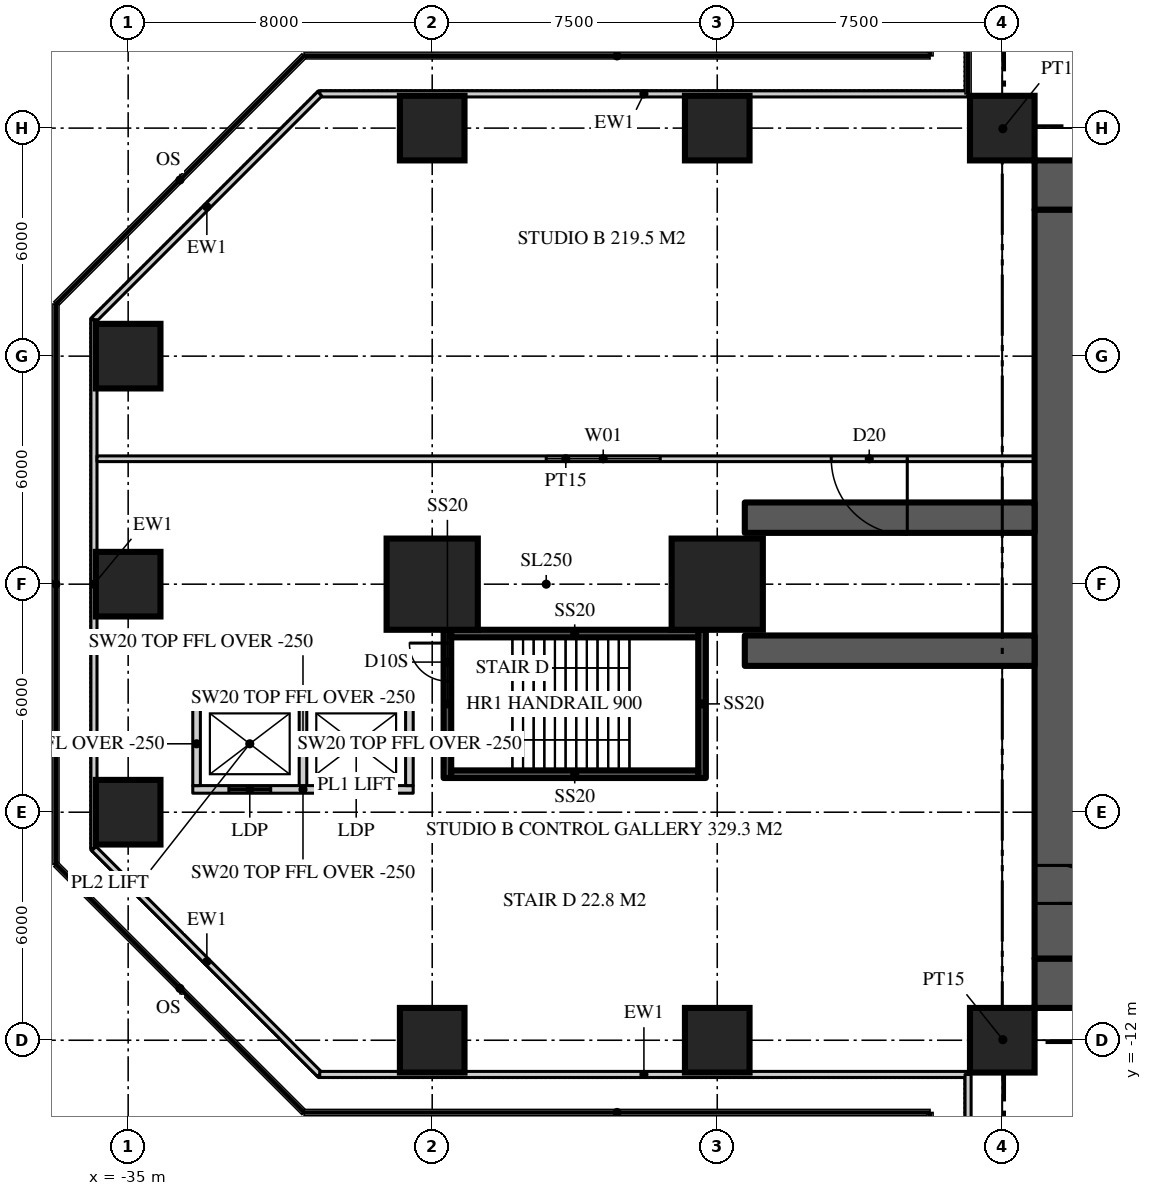
"""IFC4 building model, lengths in metres.
Left out: names, types, materials, properties, quantities, classifications, styles, units other than length and angle.
Written with IfcOpenShell. Run it as: python <this file> out.ifc"""

import sys

from ifc_helpers import new_model, si_unit, direction, frame, frame_2d, origin, origin_2d, place, context, subcontext, project, spatial, rectangle, extrude, element, fill, save


model = new_model("IFC4")
c1 = context("Model", 3, precision=1e-05, world=origin(), true_north=direction((0.0, 1.0)))
c2 = subcontext(c1, "Body", "Model", "MODEL_VIEW")
j1 = project(units=[si_unit("LENGTHUNIT", "METRE"), si_unit("PLANEANGLEUNIT", "RADIAN")], contexts=[c1])
p1 = place(None, origin())
s1 = spatial("IfcSite", under=j1, at=p1, CompositionType="ELEMENT")
p2 = place(p1, origin())
s2 = spatial("IfcBuilding", under=s1, at=p2, CompositionType="ELEMENT")
p3 = place(p2, frame((0.0, 0.0, 7.0)))
s3 = spatial("IfcBuildingStorey", under=s2, at=p3, CompositionType="ELEMENT", Elevation=7.0)
p4 = place(p3, frame((-11.15, 10.5, 0.0), z_axis=(0.0, 0.0, 1.0), x_axis=(1.0, 0.0, 0.0)))
e1 = element("IfcWall", 1, at=p4, inside=s3, PredefinedType="SHEAR", context=c2, shape_type="SweptSolid", body=[
    extrude(rectangle(XDim=22.3, YDim=1.3, at=frame_2d((11.15, 0.0))), origin(), (0.0, 0.0, 1.0), 8.0),
])
p5 = place(p4, frame((4.25, 0.0, 0.0)))
e2 = element("IfcOpeningElement", 2, at=p5, cuts=e1, PredefinedType="OPENING", context=c2, shape_type="SweptSolid", body=[
    extrude(rectangle(XDim=1.8, YDim=2.2, at=frame_2d((0.9, 1.1))), frame((0.0, 0.66, 0.0), z_axis=(0.0, -1.0, 0.0), x_axis=(1.0, 0.0, 0.0)), (0.0, 0.0, 1.0), 1.32),
])
p6 = place(p4, frame((16.25, 0.0, 0.0)))
e3 = element("IfcOpeningElement", 3, at=p6, cuts=e1, PredefinedType="OPENING", context=c2, shape_type="SweptSolid", body=[
    extrude(rectangle(XDim=1.8, YDim=2.2, at=frame_2d((0.9, 1.1))), frame((0.0, 0.66, 0.0), z_axis=(0.0, -1.0, 0.0), x_axis=(1.0, 0.0, 0.0)), (0.0, 0.0, 1.0), 1.32),
])
p7 = place(p3, frame((11.15, -10.5, 0.0), z_axis=(0.0, 0.0, 1.0), x_axis=(-1.0, 0.0, 0.0)))
e4 = element("IfcWall", 4, at=p7, inside=s3, PredefinedType="SHEAR", context=c2, shape_type="SweptSolid", body=[
    extrude(rectangle(XDim=22.3, YDim=1.3, at=frame_2d((11.15, 0.0))), origin(), (0.0, 0.0, 1.0), 8.0),
])
p8 = place(p7, frame((16.25, 0.0, 0.0)))
e5 = element("IfcOpeningElement", 5, at=p8, cuts=e4, PredefinedType="OPENING", context=c2, shape_type="SweptSolid", body=[
    extrude(rectangle(XDim=1.8, YDim=2.2, at=frame_2d((0.9, 1.1))), frame((0.0, 0.66, 0.0), z_axis=(0.0, -1.0, 0.0), x_axis=(1.0, 0.0, 0.0)), (0.0, 0.0, 1.0), 1.32),
])
p9 = place(p7, frame((4.25, 0.0, 0.0)))
e6 = element("IfcOpeningElement", 6, at=p9, cuts=e4, PredefinedType="OPENING", context=c2, shape_type="SweptSolid", body=[
    extrude(rectangle(XDim=1.8, YDim=2.2, at=frame_2d((0.9, 1.1))), frame((0.0, 0.66, 0.0), z_axis=(0.0, -1.0, 0.0), x_axis=(1.0, 0.0, 0.0)), (0.0, 0.0, 1.0), 1.32),
])
p10 = place(p3, frame((-10.5, 9.85, 0.0), z_axis=(0.0, 0.0, 1.0), x_axis=(0.0, -1.0, 0.0)))
e7 = element("IfcWall", 7, at=p10, inside=s3, PredefinedType="SHEAR", context=c2, shape_type="SweptSolid", body=[
    extrude(rectangle(XDim=19.7, YDim=1.3, at=frame_2d((9.85, 0.0))), origin(), (0.0, 0.0, 1.0), 8.0),
])
p11 = place(p10, frame((17.25, 0.0, 0.0)))
e8 = element("IfcOpeningElement", 8, at=p11, cuts=e7, PredefinedType="OPENING", context=c2, shape_type="SweptSolid", body=[
    extrude(rectangle(XDim=1.0, YDim=2.2, at=frame_2d((0.5, 1.1))), frame((0.0, 0.66, 0.0), z_axis=(0.0, -1.0, 0.0), x_axis=(1.0, 0.0, 0.0)), (0.0, 0.0, 1.0), 1.32),
])
for number, where, z_axis, x_axis in (
    (9, (-11.15, 1.75, 0.0), (0.0, 0.0, 1.0), (-1.0, 0.0, 0.0)),
    (10, (-11.15, -1.75, 0.0), (0.0, 0.0, 1.0), (-1.0, 0.0, 0.0)),
):
    element("IfcWall", number, at=place(p3, frame(where, z_axis=z_axis, x_axis=x_axis)), inside=s3, PredefinedType="SHEAR", context=c2, shape_type="SweptSolid", body=[
        extrude(rectangle(XDim=7.625, YDim=0.8, at=frame_2d((3.812, 0.0))), origin(), (0.0, 0.0, 1.0), 8.0),
    ])
for number, where, z_axis, x_axis in (
    (11, (-27.0, -12.0, 0.0), (0.0, 0.0, 1.0), (1.0, 0.0, 0.0)),
    (12, (-19.5, -12.0, 0.0), (0.0, 0.0, 1.0), (1.0, 0.0, 0.0)),
    (13, (-12.0, -12.0, 0.0), (0.0, 0.0, 1.0), (1.0, 0.0, 0.0)),
    (14, (-35.0, -6.0, 0.0), (0.0, 0.0, 1.0), (1.0, 0.0, 0.0)),
    (15, (-35.0, 0.0, 0.0), (0.0, 0.0, 1.0), (1.0, 0.0, 0.0)),
):
    element("IfcColumn", number, at=place(p3, frame(where, z_axis=z_axis, x_axis=x_axis)), inside=s3, PredefinedType="COLUMN", context=c2, shape_type="SweptSolid", body=[
        extrude(rectangle(XDim=1.7, YDim=1.7, at=origin_2d()), origin(), (0.0, 0.0, 1.0), 8.0),
    ])
for number, where, z_axis, x_axis in (
    (16, (-27.0, 0.0, 0.0), (0.0, 0.0, 1.0), (1.0, 0.0, 0.0)),
    (17, (-19.5, 0.0, 0.0), (0.0, 0.0, 1.0), (1.0, 0.0, 0.0)),
):
    element("IfcColumn", number, at=place(p3, frame(where, z_axis=z_axis, x_axis=x_axis)), inside=s3, PredefinedType="COLUMN", context=c2, shape_type="SweptSolid", body=[
        extrude(rectangle(XDim=2.4, YDim=2.4, at=origin_2d()), origin(), (0.0, 0.0, 1.0), 8.0),
    ])
for number, where, z_axis, x_axis in (
    (18, (-35.0, 6.0, 0.0), (0.0, 0.0, 1.0), (1.0, 0.0, 0.0)),
    (19, (-27.0, 12.0, 0.0), (0.0, 0.0, 1.0), (1.0, 0.0, 0.0)),
    (20, (-19.5, 12.0, 0.0), (0.0, 0.0, 1.0), (1.0, 0.0, 0.0)),
    (21, (-12.0, 12.0, 0.0), (0.0, 0.0, 1.0), (1.0, 0.0, 0.0)),
):
    element("IfcColumn", number, at=place(p3, frame(where, z_axis=z_axis, x_axis=x_axis)), inside=s3, PredefinedType="COLUMN", context=c2, shape_type="SweptSolid", body=[
        extrude(rectangle(XDim=1.7, YDim=1.7, at=origin_2d()), origin(), (0.0, 0.0, 1.0), 8.0),
    ])
p12 = place(p3, frame((-12.9, 12.9, 0.0), z_axis=(0.0, 0.0, 1.0), x_axis=(-1.0, 0.0, 0.0)))
e22 = element("IfcWall", 22, at=p12, inside=s3, PredefinedType="SOLIDWALL", context=c2, shape_type="SweptSolid", body=[
    extrude(rectangle(XDim=17.059, YDim=0.16, at=frame_2d((8.529, 0.0))), origin(), (0.0, 0.0, 1.0), 7.75),
])
p13 = place(p3, frame((-29.958, 12.9, 0.0), z_axis=(0.0, 0.0, 1.0), x_axis=(-0.707106781187, -0.707106781187, 0.0)))
e23 = element("IfcWall", 23, at=p13, inside=s3, PredefinedType="SOLIDWALL", context=c2, shape_type="SweptSolid", body=[
    extrude(rectangle(XDim=8.402, YDim=0.16, at=frame_2d((4.201, 0.0))), origin(), (0.0, 0.0, 1.0), 7.75),
])
p14 = place(p3, frame((-35.9, 6.958, 0.0), z_axis=(0.0, 0.0, 1.0), x_axis=(0.0, -1.0, 0.0)))
e24 = element("IfcWall", 24, at=p14, inside=s3, PredefinedType="SOLIDWALL", context=c2, shape_type="SweptSolid", body=[
    extrude(rectangle(XDim=13.917, YDim=0.16, at=frame_2d((6.958, 0.0))), origin(), (0.0, 0.0, 1.0), 7.75),
])
p15 = place(p3, frame((-35.9, -6.958, 0.0), z_axis=(0.0, 0.0, 1.0), x_axis=(0.707106781187, -0.707106781187, 0.0)))
e25 = element("IfcWall", 25, at=p15, inside=s3, PredefinedType="SOLIDWALL", context=c2, shape_type="SweptSolid", body=[
    extrude(rectangle(XDim=8.402, YDim=0.16, at=frame_2d((4.201, 0.0))), origin(), (0.0, 0.0, 1.0), 7.75),
])
for number, where, z_axis, x_axis in (
    (26, (-29.958, -12.9, 0.0), (0.0, 0.0, 1.0), (1.0, 0.0, 0.0)),
    (27, (-12.9, -12.9, 0.0), (0.0, 0.0, 1.0), (0.0, -1.0, 0.0)),
):
    element("IfcWall", number, at=place(p3, frame(where, z_axis=z_axis, x_axis=x_axis)), inside=s3, PredefinedType="SOLIDWALL", context=c2, shape_type="SweptSolid", body=[
        extrude(rectangle(XDim=17.059, YDim=0.16, at=frame_2d((8.529, 0.0))), origin(), (0.0, 0.0, 1.0), 7.75),
    ])
p16 = place(p3, frame((-11.15, 3.3, 0.0), z_axis=(0.0, 0.0, 1.0), x_axis=(-1.0, 0.0, 0.0)))
e28 = element("IfcWall", 28, at=p16, inside=s3, PredefinedType="PARTITIONING", context=c2, shape_type="SweptSolid", body=[
    extrude(rectangle(XDim=24.67, YDim=0.15, at=frame_2d((12.335, 0.0))), origin(), (0.0, 0.0, 1.0), 7.75),
])
p17 = place(p16, frame((3.35, 0.0, 0.0)))
e29 = element("IfcOpeningElement", 29, at=p17, cuts=e28, PredefinedType="OPENING", context=c2, shape_type="SweptSolid", body=[
    extrude(rectangle(XDim=2.0, YDim=2.6, at=frame_2d((1.0, 1.3))), frame((0.0, 0.085, 0.0), z_axis=(0.0, -1.0, 0.0), x_axis=(1.0, 0.0, 0.0)), (0.0, 0.0, 1.0), 0.17),
])
p18 = place(p16, frame((9.85, 0.0, 0.9)))
e30 = element("IfcOpeningElement", 30, at=p18, cuts=e28, PredefinedType="OPENING", context=c2, shape_type="SweptSolid", body=[
    extrude(rectangle(XDim=3.0, YDim=1.5, at=frame_2d((1.5, 0.75))), frame((0.0, 0.085, 0.0), z_axis=(0.0, -1.0, 0.0), x_axis=(1.0, 0.0, 0.0)), (0.0, 0.0, 1.0), 0.17),
])
for number, where, z_axis, x_axis in (
    (31, (-11.15, 11.15, 0.0), (0.0, 0.0, 1.0), (-0.707, 0.707, 0.0)),
    (32, (-11.15, -11.15, 0.0), (0.0, 0.0, 1.0), (-0.707, -0.707, 0.0)),
):
    element("IfcWall", number, at=place(p3, frame(where, z_axis=z_axis, x_axis=x_axis)), inside=s3, PredefinedType="PARTITIONING", context=c2, shape_type="SweptSolid", body=[
        extrude(rectangle(XDim=2.362, YDim=0.15, at=frame_2d((1.181, 0.0))), origin(), (0.0, 0.0, 1.0), 7.75),
    ])
p19 = place(p3, frame((-27.5, -3.0, 0.0), z_axis=(0.0, 0.0, 1.0), x_axis=(-1.0, 0.0, 0.0)))
e33 = element("IfcWall", 33, at=p19, inside=s3, PredefinedType="SOLIDWALL", context=c2, shape_type="SweptSolid", body=[
    extrude(rectangle(XDim=5.8, YDim=0.2, at=frame_2d((2.9, 0.0))), origin(), (0.0, 0.0, 1.0), 7.75),
])
p20 = place(p3, frame((-33.3, -5.4, 0.0), z_axis=(0.0, 0.0, 1.0), x_axis=(1.0, 0.0, 0.0)))
e34 = element("IfcWall", 34, at=p20, inside=s3, PredefinedType="SOLIDWALL", context=c2, shape_type="SweptSolid", body=[
    extrude(rectangle(XDim=5.8, YDim=0.2, at=frame_2d((2.9, 0.0))), origin(), (0.0, 0.0, 1.0), 7.75),
])
p21 = place(p20, frame((3.75, 0.0, 0.0)))
e35 = element("IfcOpeningElement", 35, at=p21, cuts=e34, PredefinedType="OPENING", context=c2, shape_type="SweptSolid", body=[
    extrude(rectangle(XDim=1.1, YDim=2.2, at=frame_2d((0.55, 1.1))), frame((0.0, 0.11, 0.0), z_axis=(0.0, -1.0, 0.0), x_axis=(1.0, 0.0, 0.0)), (0.0, 0.0, 1.0), 0.22),
])
p22 = place(p20, frame((0.95, 0.0, 0.0)))
e36 = element("IfcOpeningElement", 36, at=p22, cuts=e34, PredefinedType="OPENING", context=c2, shape_type="SweptSolid", body=[
    extrude(rectangle(XDim=1.1, YDim=2.2, at=frame_2d((0.55, 1.1))), frame((0.0, 0.11, 0.0), z_axis=(0.0, -1.0, 0.0), x_axis=(1.0, 0.0, 0.0)), (0.0, 0.0, 1.0), 0.22),
])
for number, where, z_axis, x_axis in (
    (37, (-27.6, -3.1, 0.0), (0.0, 0.0, 1.0), (0.0, -1.0, 0.0)),
    (38, (-30.4, -3.1, 0.0), (0.0, 0.0, 1.0), (0.0, -1.0, 0.0)),
    (39, (-33.2, -3.1, 0.0), (0.0, 0.0, 1.0), (0.0, -1.0, 0.0)),
):
    element("IfcWall", number, at=place(p3, frame(where, z_axis=z_axis, x_axis=x_axis)), inside=s3, PredefinedType="SOLIDWALL", context=c2, shape_type="SweptSolid", body=[
        extrude(rectangle(XDim=2.2, YDim=0.2, at=frame_2d((1.1, 0.0))), origin(), (0.0, 0.0, 1.0), 7.75),
    ])
p23 = place(p3, frame((-19.9, -1.2, 0.0), z_axis=(0.0, 0.0, 1.0), x_axis=(0.0, -1.0, 0.0)))
e40 = element("IfcWall", 40, at=p23, inside=s3, PredefinedType="SOLIDWALL", context=c2, shape_type="SweptSolid", body=[
    extrude(rectangle(XDim=3.9, YDim=0.2, at=frame_2d((1.95, 0.0))), origin(), (0.0, 0.0, 1.0), 7.75),
])
p24 = place(p3, frame((-26.6, -5.1, 0.0), z_axis=(0.0, 0.0, 1.0), x_axis=(0.0, 1.0, 0.0)))
e41 = element("IfcWall", 41, at=p24, inside=s3, PredefinedType="SOLIDWALL", context=c2, shape_type="SweptSolid", body=[
    extrude(rectangle(XDim=3.9, YDim=0.2, at=frame_2d((1.95, 0.0))), origin(), (0.0, 0.0, 1.0), 7.75),
])
p25 = place(p24, frame((2.55, 0.0, 0.0)))
e42 = element("IfcOpeningElement", 42, at=p25, cuts=e41, PredefinedType="OPENING", context=c2, shape_type="SweptSolid", body=[
    extrude(rectangle(XDim=1.0, YDim=2.2, at=frame_2d((0.5, 1.1))), frame((0.0, 0.11, 0.0), z_axis=(0.0, -1.0, 0.0), x_axis=(1.0, 0.0, 0.0)), (0.0, 0.0, 1.0), 0.22),
])
for number, where, z_axis, x_axis in (
    (43, (-20.0, -1.3, 0.0), (0.0, 0.0, 1.0), (-1.0, 0.0, 0.0)),
    (44, (-26.5, -5.0, 0.0), (0.0, 0.0, 1.0), (1.0, 0.0, 0.0)),
):
    element("IfcWall", number, at=place(p3, frame(where, z_axis=z_axis, x_axis=x_axis)), inside=s3, PredefinedType="SOLIDWALL", context=c2, shape_type="SweptSolid", body=[
        extrude(rectangle(XDim=6.5, YDim=0.2, at=frame_2d((3.25, 0.0))), origin(), (0.0, 0.0, 1.0), 7.75),
    ])
p26 = place(p21, origin())
e45 = element("IfcDoor", 45, at=p26, inside=s3, OperationType="SLIDING_TO_LEFT", PredefinedType="DOOR", context=c2, shape_type="SweptSolid", body=[
    extrude(rectangle(XDim=1.1, YDim=2.2, at=frame_2d((0.55, 1.1))), frame((0.0, 0.025, 0.0), z_axis=(0.0, -1.0, 0.0), x_axis=(1.0, 0.0, 0.0)), (0.0, 0.0, 1.0), 0.05),
])
fill(e35, e45)
p27 = place(p22, origin())
e46 = element("IfcDoor", 46, at=p27, inside=s3, OperationType="SLIDING_TO_LEFT", PredefinedType="DOOR", context=c2, shape_type="SweptSolid", body=[
    extrude(rectangle(XDim=1.1, YDim=2.2, at=frame_2d((0.55, 1.1))), frame((0.0, 0.025, 0.0), z_axis=(0.0, -1.0, 0.0), x_axis=(1.0, 0.0, 0.0)), (0.0, 0.0, 1.0), 0.05),
])
fill(e36, e46)
p28 = place(p11, origin())
e47 = element("IfcDoor", 47, at=p28, inside=s3, OperationType="SINGLE_SWING_RIGHT", PredefinedType="DOOR", context=c2, shape_type="SweptSolid", body=[
    extrude(rectangle(XDim=1.0, YDim=2.2, at=frame_2d((0.5, 1.1))), frame((0.0, 0.025, 0.0), z_axis=(0.0, -1.0, 0.0), x_axis=(1.0, 0.0, 0.0)), (0.0, 0.0, 1.0), 0.05),
])
fill(e8, e47)
p29 = place(p17, origin())
e48 = element("IfcDoor", 48, at=p29, inside=s3, OperationType="DOUBLE_DOOR_DOUBLE_SWING", PredefinedType="DOOR", context=c2, shape_type="SweptSolid", body=[
    extrude(rectangle(XDim=2.0, YDim=2.6, at=frame_2d((1.0, 1.3))), frame((0.0, 0.025, 0.0), z_axis=(0.0, -1.0, 0.0), x_axis=(1.0, 0.0, 0.0)), (0.0, 0.0, 1.0), 0.05),
])
fill(e29, e48)
p30 = place(p25, origin())
e49 = element("IfcDoor", 49, at=p30, inside=s3, OperationType="SINGLE_SWING_RIGHT", PredefinedType="DOOR", context=c2, shape_type="SweptSolid", body=[
    extrude(rectangle(XDim=1.0, YDim=2.2, at=frame_2d((0.5, 1.1))), frame((0.0, 0.025, 0.0), z_axis=(0.0, -1.0, 0.0), x_axis=(1.0, 0.0, 0.0)), (0.0, 0.0, 1.0), 0.05),
])
fill(e42, e49)
p31 = place(p18, origin())
e50 = element("IfcWindow", 50, at=p31, inside=s3, PartitioningType="SINGLE_PANEL", PredefinedType="WINDOW", context=c2, shape_type="SweptSolid", body=[
    extrude(rectangle(XDim=3.0, YDim=1.5, at=frame_2d((1.5, 0.75))), frame((0.0, 0.03, 0.0), z_axis=(0.0, -1.0, 0.0), x_axis=(1.0, 0.0, 0.0)), (0.0, 0.0, 1.0), 0.06),
])
fill(e30, e50)
save(model, sys.argv[1])
